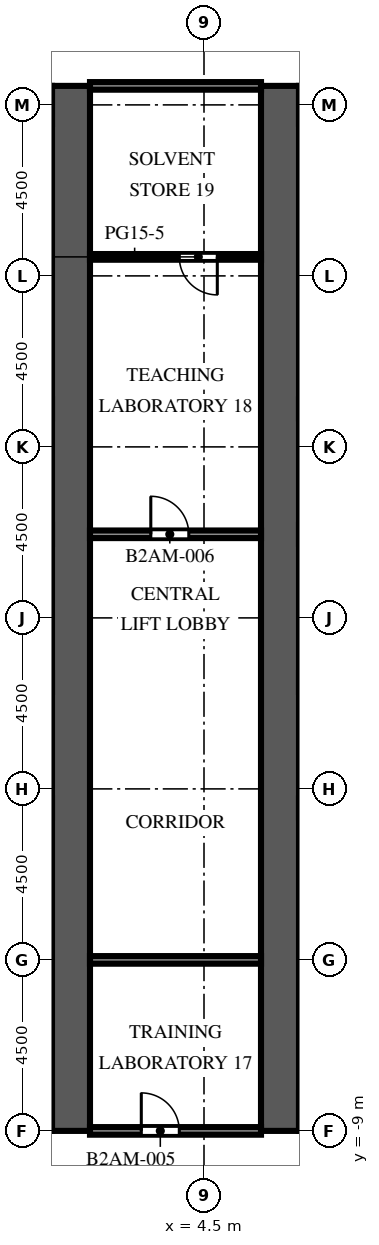
"""IFC4 building model, lengths in metres.
Left out: names, types, materials, properties, quantities, classifications, styles, units other than length and angle.
Written with IfcOpenShell. Run it as: python <this file> out.ifc"""

import sys

from ifc_helpers import new_model, si_unit, direction, frame, frame_2d, origin, place, context, subcontext, project, spatial, rectangle, extrude, element, fill, save


model = new_model("IFC4")
c1 = context("Model", 3, precision=1e-05, world=origin(), true_north=direction((0.0, 1.0)))
c2 = subcontext(c1, "Body", "Model", "MODEL_VIEW")
j1 = project(units=[si_unit("LENGTHUNIT", "METRE"), si_unit("PLANEANGLEUNIT", "RADIAN")], contexts=[c1])
p1 = place(None, origin())
s1 = spatial("IfcSite", under=j1, at=p1, CompositionType="ELEMENT")
p2 = place(p1, origin())
s2 = spatial("IfcBuilding", under=s1, at=p2, CompositionType="ELEMENT")
p3 = place(p2, frame((0.0, 0.0, 70.6)))
s3 = spatial("IfcBuildingStorey", under=s2, at=p3, CompositionType="ELEMENT", Elevation=70.6)
p4 = place(p3, frame((1.0, -9.0, 0.0), z_axis=(0.0, 0.0, 1.0), x_axis=(0.0, 1.0, 0.0)))
e1 = element("IfcWall", 1, at=p4, inside=s3, PredefinedType="SHEAR", context=c2, shape_type="SweptSolid", body=[
    extrude(rectangle(XDim=27.5, YDim=1.0, at=frame_2d((13.75, 0.0))), origin(), (0.0, 0.0, 1.0), 6.0),
])
p5 = place(p4, frame((12.55, 0.0, 0.0)))
e2 = element("IfcOpeningElement", 2, at=p5, cuts=e1, PredefinedType="OPENING", context=c2, shape_type="SweptSolid", body=[
    extrude(rectangle(XDim=2.4, YDim=2.4, at=frame_2d((1.2, 1.2))), frame((0.0, 0.51, 0.0), z_axis=(0.0, -1.0, 0.0), x_axis=(1.0, 0.0, 0.0)), (0.0, 0.0, 1.0), 1.02),
])
p6 = place(p4, frame((5.475, 0.0, 0.0)))
e3 = element("IfcOpeningElement", 3, at=p6, cuts=e1, PredefinedType="OPENING", context=c2, shape_type="SweptSolid", body=[
    extrude(rectangle(XDim=1.2, YDim=2.1, at=frame_2d((0.6, 1.05))), frame((0.0, 0.51, 0.0), z_axis=(0.0, -1.0, 0.0), x_axis=(1.0, 0.0, 0.0)), (0.0, 0.0, 1.0), 1.02),
])
p7 = place(p4, frame((19.475, 0.0, 0.0)))
e4 = element("IfcOpeningElement", 4, at=p7, cuts=e1, PredefinedType="OPENING", context=c2, shape_type="SweptSolid", body=[
    extrude(rectangle(XDim=1.0, YDim=2.1, at=frame_2d((0.5, 1.05))), frame((0.0, 0.51, 0.0), z_axis=(0.0, -1.0, 0.0), x_axis=(1.0, 0.0, 0.0)), (0.0, 0.0, 1.0), 1.02),
])
p8 = place(p4, frame((21.106, 0.0, 0.0)))
e5 = element("IfcOpeningElement", 5, at=p8, cuts=e1, PredefinedType="OPENING", context=c2, shape_type="SweptSolid", body=[
    extrude(rectangle(XDim=1.0, YDim=2.1, at=frame_2d((0.5, 1.05))), frame((0.0, 0.51, 0.0), z_axis=(0.0, -1.0, 0.0), x_axis=(1.0, 0.0, 0.0)), (0.0, 0.0, 1.0), 1.02),
])
p9 = place(p4, frame((23.1, 0.0, 0.0)))
e6 = element("IfcOpeningElement", 6, at=p9, cuts=e1, PredefinedType="OPENING", context=c2, shape_type="SweptSolid", body=[
    extrude(rectangle(XDim=1.0, YDim=2.1, at=frame_2d((0.5, 1.05))), frame((0.0, 0.51, 0.0), z_axis=(0.0, -1.0, 0.0), x_axis=(1.0, 0.0, 0.0)), (0.0, 0.0, 1.0), 1.02),
])
p10 = place(p4, frame((25.094, 0.0, 0.0)))
e7 = element("IfcOpeningElement", 7, at=p10, cuts=e1, PredefinedType="OPENING", context=c2, shape_type="SweptSolid", body=[
    extrude(rectangle(XDim=1.0, YDim=2.1, at=frame_2d((0.5, 1.05))), frame((0.0, 0.51, 0.0), z_axis=(0.0, -1.0, 0.0), x_axis=(1.0, 0.0, 0.0)), (0.0, 0.0, 1.0), 1.02),
])
p11 = place(p3, frame((6.5, -9.0, 0.0), z_axis=(0.0, 0.0, 1.0), x_axis=(0.0, 1.0, 0.0)))
e8 = element("IfcWall", 8, at=p11, inside=s3, PredefinedType="SHEAR", context=c2, shape_type="SweptSolid", body=[
    extrude(rectangle(XDim=27.5, YDim=1.0, at=frame_2d((13.75, 0.0))), origin(), (0.0, 0.0, 1.0), 6.0),
])
p12 = place(p11, frame((12.55, 0.0, 0.0)))
e9 = element("IfcOpeningElement", 9, at=p12, cuts=e8, PredefinedType="OPENING", context=c2, shape_type="SweptSolid", body=[
    extrude(rectangle(XDim=2.4, YDim=2.4, at=frame_2d((1.2, 1.2))), frame((0.0, 0.51, 0.0), z_axis=(0.0, -1.0, 0.0), x_axis=(1.0, 0.0, 0.0)), (0.0, 0.0, 1.0), 1.02),
])
p13 = place(p11, frame((5.475, 0.0, 0.0)))
e10 = element("IfcOpeningElement", 10, at=p13, cuts=e8, PredefinedType="OPENING", context=c2, shape_type="SweptSolid", body=[
    extrude(rectangle(XDim=1.2, YDim=2.1, at=frame_2d((0.6, 1.05))), frame((0.0, 0.51, 0.0), z_axis=(0.0, -1.0, 0.0), x_axis=(1.0, 0.0, 0.0)), (0.0, 0.0, 1.0), 1.02),
])
p14 = place(p11, frame((19.475, 0.0, 0.0)))
e11 = element("IfcOpeningElement", 11, at=p14, cuts=e8, PredefinedType="OPENING", context=c2, shape_type="SweptSolid", body=[
    extrude(rectangle(XDim=1.0, YDim=2.1, at=frame_2d((0.5, 1.05))), frame((0.0, 0.51, 0.0), z_axis=(0.0, -1.0, 0.0), x_axis=(1.0, 0.0, 0.0)), (0.0, 0.0, 1.0), 1.02),
])
p15 = place(p11, frame((21.106, 0.0, 0.0)))
e12 = element("IfcOpeningElement", 12, at=p15, cuts=e8, PredefinedType="OPENING", context=c2, shape_type="SweptSolid", body=[
    extrude(rectangle(XDim=1.0, YDim=2.1, at=frame_2d((0.5, 1.05))), frame((0.0, 0.51, 0.0), z_axis=(0.0, -1.0, 0.0), x_axis=(1.0, 0.0, 0.0)), (0.0, 0.0, 1.0), 1.02),
])
p16 = place(p11, frame((23.1, 0.0, 0.0)))
e13 = element("IfcOpeningElement", 13, at=p16, cuts=e8, PredefinedType="OPENING", context=c2, shape_type="SweptSolid", body=[
    extrude(rectangle(XDim=1.0, YDim=2.1, at=frame_2d((0.5, 1.05))), frame((0.0, 0.51, 0.0), z_axis=(0.0, -1.0, 0.0), x_axis=(1.0, 0.0, 0.0)), (0.0, 0.0, 1.0), 1.02),
])
p17 = place(p11, frame((25.094, 0.0, 0.0)))
e14 = element("IfcOpeningElement", 14, at=p17, cuts=e8, PredefinedType="OPENING", context=c2, shape_type="SweptSolid", body=[
    extrude(rectangle(XDim=1.0, YDim=2.1, at=frame_2d((0.5, 1.05))), frame((0.0, 0.51, 0.0), z_axis=(0.0, -1.0, 0.0), x_axis=(1.0, 0.0, 0.0)), (0.0, 0.0, 1.0), 1.02),
])
p18 = place(p3, frame((1.5, -9.0, 0.0), z_axis=(0.0, 0.0, 1.0), x_axis=(1.0, 0.0, 0.0)))
e15 = element("IfcWall", 15, at=p18, inside=s3, PredefinedType="PARTITIONING", context=c2, shape_type="SweptSolid", body=[
    extrude(rectangle(XDim=4.5, YDim=0.2, at=frame_2d((2.25, 0.0))), origin(), (0.0, 0.0, 1.0), 5.4),
])
p19 = place(p18, frame((1.35, 0.0, 0.0)))
e16 = element("IfcOpeningElement", 16, at=p19, cuts=e15, PredefinedType="OPENING", context=c2, shape_type="SweptSolid", body=[
    extrude(rectangle(XDim=1.0, YDim=2.1, at=frame_2d((0.5, 1.05))), frame((0.0, 0.11, 0.0), z_axis=(0.0, -1.0, 0.0), x_axis=(1.0, 0.0, 0.0)), (0.0, 0.0, 1.0), 0.22),
])
p20 = place(p3, frame((1.5, -4.5, 0.0), z_axis=(0.0, 0.0, 1.0), x_axis=(1.0, 0.0, 0.0)))
e17 = element("IfcWall", 17, at=p20, inside=s3, PredefinedType="PARTITIONING", context=c2, shape_type="SweptSolid", body=[
    extrude(rectangle(XDim=4.5, YDim=0.2, at=frame_2d((2.25, 0.0))), origin(), (0.0, 0.0, 1.0), 5.4),
])
p21 = place(p3, frame((1.5, 6.7, 0.0), z_axis=(0.0, 0.0, 1.0), x_axis=(1.0, 0.0, 0.0)))
e18 = element("IfcWall", 18, at=p21, inside=s3, PredefinedType="PARTITIONING", context=c2, shape_type="SweptSolid", body=[
    extrude(rectangle(XDim=4.5, YDim=0.2, at=frame_2d((2.25, 0.0))), origin(), (0.0, 0.0, 1.0), 5.4),
])
p22 = place(p21, frame((1.6, 0.0, 0.0)))
e19 = element("IfcOpeningElement", 19, at=p22, cuts=e18, PredefinedType="OPENING", context=c2, shape_type="SweptSolid", body=[
    extrude(rectangle(XDim=1.0, YDim=2.1, at=frame_2d((0.5, 1.05))), frame((0.0, 0.11, 0.0), z_axis=(0.0, -1.0, 0.0), x_axis=(1.0, 0.0, 0.0)), (0.0, 0.0, 1.0), 0.22),
])
p23 = place(p3, frame((1.5, 14.0, 0.0), z_axis=(0.0, 0.0, 1.0), x_axis=(1.0, 0.0, 0.0)))
e20 = element("IfcWall", 20, at=p23, inside=s3, PredefinedType="PARTITIONING", context=c2, shape_type="SweptSolid", body=[
    extrude(rectangle(XDim=4.5, YDim=0.15, at=frame_2d((2.25, 0.0))), origin(), (0.0, 0.0, 1.0), 5.4),
])
p24 = place(p23, frame((2.35, 0.0, 0.0)))
e21 = element("IfcOpeningElement", 21, at=p24, cuts=e20, PredefinedType="OPENING", context=c2, shape_type="SweptSolid", body=[
    extrude(rectangle(XDim=1.0, YDim=2.1, at=frame_2d((0.5, 1.05))), frame((0.0, 0.085, 0.0), z_axis=(0.0, -1.0, 0.0), x_axis=(1.0, 0.0, 0.0)), (0.0, 0.0, 1.0), 0.17),
])
p25 = place(p3, frame((1.5, 18.5, 0.0), z_axis=(0.0, 0.0, 1.0), x_axis=(1.0, 0.0, 0.0)))
e22 = element("IfcWall", 22, at=p25, inside=s3, PredefinedType="PARTITIONING", context=c2, shape_type="SweptSolid", body=[
    extrude(rectangle(XDim=4.5, YDim=0.2, at=frame_2d((2.25, 0.0))), origin(), (0.0, 0.0, 1.0), 5.4),
])
p26 = place(p5, origin())
e23 = element("IfcDoor", 23, at=p26, inside=s3, OperationType="DOUBLE_DOOR_DOUBLE_SWING", PredefinedType="DOOR", context=c2, shape_type="SweptSolid", body=[
    extrude(rectangle(XDim=2.4, YDim=2.4, at=frame_2d((1.2, 1.2))), frame((0.0, 0.025, 0.0), z_axis=(0.0, -1.0, 0.0), x_axis=(1.0, 0.0, 0.0)), (0.0, 0.0, 1.0), 0.05),
])
fill(e2, e23)
p27 = place(p12, origin())
e24 = element("IfcDoor", 24, at=p27, inside=s3, OperationType="DOUBLE_DOOR_DOUBLE_SWING", PredefinedType="DOOR", context=c2, shape_type="SweptSolid", body=[
    extrude(rectangle(XDim=2.4, YDim=2.4, at=frame_2d((1.2, 1.2))), frame((0.0, 0.025, 0.0), z_axis=(0.0, -1.0, 0.0), x_axis=(1.0, 0.0, 0.0)), (0.0, 0.0, 1.0), 0.05),
])
fill(e9, e24)
p28 = place(p6, origin())
e25 = element("IfcDoor", 25, at=p28, inside=s3, OperationType="SINGLE_SWING_LEFT", PredefinedType="DOOR", context=c2, shape_type="SweptSolid", body=[
    extrude(rectangle(XDim=1.2, YDim=2.1, at=frame_2d((0.6, 1.05))), frame((0.0, 0.475, 0.0), z_axis=(0.0, -1.0, 0.0), x_axis=(1.0, 0.0, 0.0)), (0.0, 0.0, 1.0), 0.05),
])
fill(e3, e25)
p29 = place(p7, origin())
e26 = element("IfcDoor", 26, at=p29, inside=s3, OperationType="SINGLE_SWING_LEFT", PredefinedType="DOOR", context=c2, shape_type="SweptSolid", body=[
    extrude(rectangle(XDim=1.0, YDim=2.1, at=frame_2d((0.5, 1.05))), frame((0.0, 0.475, 0.0), z_axis=(0.0, -1.0, 0.0), x_axis=(1.0, 0.0, 0.0)), (0.0, 0.0, 1.0), 0.05),
])
fill(e4, e26)
p30 = place(p8, origin())
e27 = element("IfcDoor", 27, at=p30, inside=s3, OperationType="SINGLE_SWING_RIGHT", PredefinedType="DOOR", context=c2, shape_type="SweptSolid", body=[
    extrude(rectangle(XDim=1.0, YDim=2.1, at=frame_2d((0.5, 1.05))), frame((0.0, 0.475, 0.0), z_axis=(0.0, -1.0, 0.0), x_axis=(1.0, 0.0, 0.0)), (0.0, 0.0, 1.0), 0.05),
])
fill(e5, e27)
p31 = place(p9, origin())
e28 = element("IfcDoor", 28, at=p31, inside=s3, OperationType="SINGLE_SWING_LEFT", PredefinedType="DOOR", context=c2, shape_type="SweptSolid", body=[
    extrude(rectangle(XDim=1.0, YDim=2.1, at=frame_2d((0.5, 1.05))), frame((0.0, 0.475, 0.0), z_axis=(0.0, -1.0, 0.0), x_axis=(1.0, 0.0, 0.0)), (0.0, 0.0, 1.0), 0.05),
])
fill(e6, e28)
p32 = place(p10, origin())
e29 = element("IfcDoor", 29, at=p32, inside=s3, OperationType="SINGLE_SWING_RIGHT", PredefinedType="DOOR", context=c2, shape_type="SweptSolid", body=[
    extrude(rectangle(XDim=1.0, YDim=2.1, at=frame_2d((0.5, 1.05))), frame((0.0, 0.475, 0.0), z_axis=(0.0, -1.0, 0.0), x_axis=(1.0, 0.0, 0.0)), (0.0, 0.0, 1.0), 0.05),
])
fill(e7, e29)
p33 = place(p13, origin())
e30 = element("IfcDoor", 30, at=p33, inside=s3, OperationType="SINGLE_SWING_RIGHT", PredefinedType="DOOR", context=c2, shape_type="SweptSolid", body=[
    extrude(rectangle(XDim=1.2, YDim=2.1, at=frame_2d((0.6, 1.05))), frame((0.0, -0.425, 0.0), z_axis=(0.0, -1.0, 0.0), x_axis=(1.0, 0.0, 0.0)), (0.0, 0.0, 1.0), 0.05),
])
fill(e10, e30)
p34 = place(p14, origin())
e31 = element("IfcDoor", 31, at=p34, inside=s3, OperationType="SINGLE_SWING_RIGHT", PredefinedType="DOOR", context=c2, shape_type="SweptSolid", body=[
    extrude(rectangle(XDim=1.0, YDim=2.1, at=frame_2d((0.5, 1.05))), frame((0.0, -0.425, 0.0), z_axis=(0.0, -1.0, 0.0), x_axis=(1.0, 0.0, 0.0)), (0.0, 0.0, 1.0), 0.05),
])
fill(e11, e31)
p35 = place(p15, origin())
e32 = element("IfcDoor", 32, at=p35, inside=s3, OperationType="SINGLE_SWING_LEFT", PredefinedType="DOOR", context=c2, shape_type="SweptSolid", body=[
    extrude(rectangle(XDim=1.0, YDim=2.1, at=frame_2d((0.5, 1.05))), frame((0.0, -0.425, 0.0), z_axis=(0.0, -1.0, 0.0), x_axis=(1.0, 0.0, 0.0)), (0.0, 0.0, 1.0), 0.05),
])
fill(e12, e32)
p36 = place(p16, origin())
e33 = element("IfcDoor", 33, at=p36, inside=s3, OperationType="SINGLE_SWING_RIGHT", PredefinedType="DOOR", context=c2, shape_type="SweptSolid", body=[
    extrude(rectangle(XDim=1.0, YDim=2.1, at=frame_2d((0.5, 1.05))), frame((0.0, -0.425, 0.0), z_axis=(0.0, -1.0, 0.0), x_axis=(1.0, 0.0, 0.0)), (0.0, 0.0, 1.0), 0.05),
])
fill(e13, e33)
p37 = place(p17, origin())
e34 = element("IfcDoor", 34, at=p37, inside=s3, OperationType="SINGLE_SWING_LEFT", PredefinedType="DOOR", context=c2, shape_type="SweptSolid", body=[
    extrude(rectangle(XDim=1.0, YDim=2.1, at=frame_2d((0.5, 1.05))), frame((0.0, -0.425, 0.0), z_axis=(0.0, -1.0, 0.0), x_axis=(1.0, 0.0, 0.0)), (0.0, 0.0, 1.0), 0.05),
])
fill(e14, e34)
p38 = place(p19, origin())
e35 = element("IfcDoor", 35, at=p38, inside=s3, OperationType="SINGLE_SWING_LEFT", PredefinedType="DOOR", context=c2, shape_type="SweptSolid", body=[
    extrude(rectangle(XDim=1.0, YDim=2.1, at=frame_2d((0.5, 1.05))), frame((0.0, 0.025, 0.0), z_axis=(0.0, -1.0, 0.0), x_axis=(1.0, 0.0, 0.0)), (0.0, 0.0, 1.0), 0.05),
])
fill(e16, e35)
p39 = place(p22, origin())
e36 = element("IfcDoor", 36, at=p39, inside=s3, OperationType="SINGLE_SWING_LEFT", PredefinedType="DOOR", context=c2, shape_type="SweptSolid", body=[
    extrude(rectangle(XDim=1.0, YDim=2.1, at=frame_2d((0.5, 1.05))), frame((0.0, 0.025, 0.0), z_axis=(0.0, -1.0, 0.0), x_axis=(1.0, 0.0, 0.0)), (0.0, 0.0, 1.0), 0.05),
])
fill(e19, e36)
p40 = place(p24, origin())
e37 = element("IfcDoor", 37, at=p40, inside=s3, OperationType="SINGLE_SWING_RIGHT", PredefinedType="DOOR", context=c2, shape_type="SweptSolid", body=[
    extrude(rectangle(XDim=1.0, YDim=2.1, at=frame_2d((0.5, 1.05))), frame((0.0, 0.025, 0.0), z_axis=(0.0, -1.0, 0.0), x_axis=(1.0, 0.0, 0.0)), (0.0, 0.0, 1.0), 0.05),
])
fill(e21, e37)
save(model, sys.argv[1])
